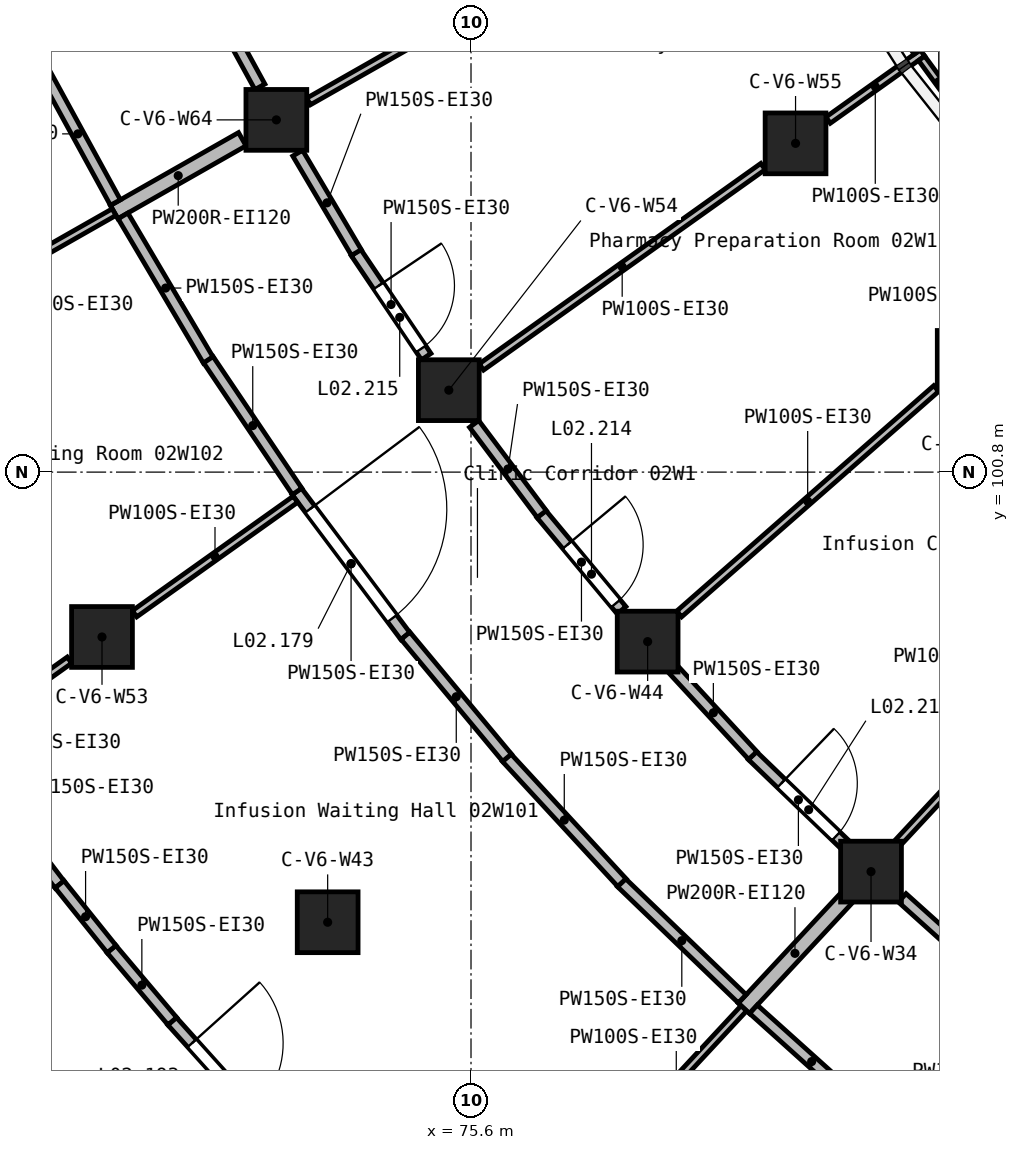
"""IFC4 building model, lengths in metres.
Left out: names, types, materials, properties, quantities, classifications, styles, units other than length and angle.
Written with IfcOpenShell. Run it as: python <this file> out.ifc"""

import sys

from ifc_helpers import new_model, si_unit, direction, frame, frame_2d, origin, origin_2d, place, context, subcontext, project, spatial, rectangle, extrude, element, fill, save


model = new_model("IFC4")
c1 = context("Model", 3, precision=1e-05, world=origin(), true_north=direction((0.0, 1.0)))
c2 = subcontext(c1, "Body", "Model", "MODEL_VIEW")
j1 = project(units=[si_unit("LENGTHUNIT", "METRE"), si_unit("PLANEANGLEUNIT", "RADIAN")], contexts=[c1])
p1 = place(None, origin())
s1 = spatial("IfcSite", under=j1, at=p1, CompositionType="ELEMENT")
p2 = place(p1, origin())
s2 = spatial("IfcBuilding", under=s1, at=p2, CompositionType="ELEMENT")
p3 = place(p2, frame((0.0, 0.0, 12.6)))
s3 = spatial("IfcBuildingStorey", under=s2, at=p3, CompositionType="ELEMENT", Elevation=12.6)
for number, where, z_axis, x_axis in (
    (1, (70.745, 98.631, 0.0), (0.0, 0.0, 1.0), (1.0, 0.0, 0.0)),
    (2, (73.039, 105.434, 0.0), (0.0, 0.0, 1.0), (1.0, 0.0, 0.0)),
    (3, (73.714, 94.878, 0.0), (0.0, 0.0, 1.0), (1.0, 0.0, 0.0)),
    (4, (75.308, 101.878, 0.0), (0.0, 0.0, 1.0), (1.0, 0.0, 0.0)),
    (5, (77.924, 98.57, 0.0), (0.0, 0.0, 1.0), (1.0, 0.0, 0.0)),
    (6, (79.87, 105.125, 0.0), (0.0, 0.0, 1.0), (1.0, 0.0, 0.0)),
    (7, (80.863, 95.544, 0.0), (0.0, 0.0, 1.0), (1.0, 0.0, 0.0)),
    (8, (82.135, 102.263, 0.0), (0.0, 0.0, 1.0), (1.0, 0.0, 0.0)),
):
    element("IfcColumn", number, at=place(p3, frame(where, z_axis=z_axis, x_axis=x_axis)), inside=s3, PredefinedType="COLUMN", context=c2, shape_type="SweptSolid", body=[
        extrude(rectangle(XDim=0.8, YDim=0.8, at=origin_2d()), origin(), (0.0, 0.0, 1.0), 4.2),
    ])
p4 = place(p3, frame((70.905, 104.221, 0.0), z_axis=(0.0, 0.0, 1.0), x_axis=(0.869256176146, 0.494361912198, 0.0)))
e9 = element("IfcWall", 9, at=p4, inside=s3, PredefinedType="SOLIDWALL", context=c2, shape_type="SweptSolid", body=[
    extrude(rectangle(XDim=1.939, YDim=0.2, at=frame_2d((0.97, 0.0))), origin(), (0.0, 0.0, 1.0), 3.85),
])
p5 = place(p3, frame((79.19, 93.746, 0.0), z_axis=(0.0, 0.0, 1.0), x_axis=(0.681171780306, 0.732123627344, 0.0)))
e10 = element("IfcWall", 10, at=p5, inside=s3, PredefinedType="SOLIDWALL", context=c2, shape_type="SweptSolid", body=[
    extrude(rectangle(XDim=1.974, YDim=0.2, at=frame_2d((0.987, 0.0))), origin(), (0.0, 0.0, 1.0), 3.85),
])
p6 = place(p3, frame((73.307, 100.547, 0.0), z_axis=(0.0, 0.0, 1.0), x_axis=(0.600377090661, -0.799717043091, 0.0)))
e11 = element("IfcWall", 11, at=p6, inside=s3, PredefinedType="PARTITIONING", context=c2, shape_type="SweptSolid", body=[
    extrude(rectangle(XDim=2.382, YDim=0.15, at=frame_2d((1.191, 0.0))), origin(), (0.0, 0.0, 1.0), 3.85),
])
p7 = place(p6, frame((0.291, 0.0, 0.0)))
e12 = element("IfcOpeningElement", 12, at=p7, cuts=e11, PredefinedType="OPENING", context=c2, shape_type="SweptSolid", body=[
    extrude(rectangle(XDim=1.8, YDim=2.1, at=frame_2d((0.9, 1.05))), frame((0.0, 0.085, 0.0), z_axis=(0.0, -1.0, 0.0), x_axis=(1.0, 0.0, 0.0)), (0.0, 0.0, 1.0), 0.17),
])
p8 = place(p3, frame((77.579, 95.4, 0.0), z_axis=(0.0, 0.0, 1.0), x_axis=(0.720594722174, -0.693356507415, 0.0)))
e13 = element("IfcWall", 13, at=p8, inside=s3, PredefinedType="PARTITIONING", context=c2, shape_type="SweptSolid", body=[
    extrude(rectangle(XDim=2.205, YDim=0.15, at=frame_2d((1.103, 0.0))), origin(), (0.0, 0.0, 1.0), 3.85),
])
p9 = place(p3, frame((76.069, 97.043, 0.0), z_axis=(0.0, 0.0, 1.0), x_axis=(0.678030610295, -0.735033666918, 0.0)))
e14 = element("IfcWall", 14, at=p9, inside=s3, PredefinedType="PARTITIONING", context=c2, shape_type="SweptSolid", body=[
    extrude(rectangle(XDim=2.236, YDim=0.15, at=frame_2d((1.118, 0.0))), origin(), (0.0, 0.0, 1.0), 3.85),
])
p10 = place(p3, frame((71.021, 104.171, 0.0), z_axis=(0.0, 0.0, 1.0), x_axis=(0.50873677225, -0.860922119916, 0.0)))
e15 = element("IfcWall", 15, at=p10, inside=s3, PredefinedType="PARTITIONING", context=c2, shape_type="SweptSolid", body=[
    extrude(rectangle(XDim=2.205, YDim=0.15, at=frame_2d((1.103, 0.0))), origin(), (0.0, 0.0, 1.0), 3.85),
])
p11 = place(p3, frame((79.316, 93.733, 0.0), z_axis=(0.0, 0.0, 1.0), x_axis=(0.74346507851, -0.668774758073, 0.0)))
e16 = element("IfcWall", 16, at=p11, inside=s3, PredefinedType="PARTITIONING", context=c2, shape_type="SweptSolid", body=[
    extrude(rectangle(XDim=2.059, YDim=0.15, at=frame_2d((1.03, 0.0))), origin(), (0.0, 0.0, 1.0), 3.85),
])
p12 = place(p3, frame((72.145, 102.278, 0.0), z_axis=(0.0, 0.0, 1.0), x_axis=(0.558900636953, -0.829234633873, 0.0)))
e17 = element("IfcWall", 17, at=p12, inside=s3, PredefinedType="PARTITIONING", context=c2, shape_type="SweptSolid", body=[
    extrude(rectangle(XDim=2.089, YDim=0.15, at=frame_2d((1.044, 0.0))), origin(), (0.0, 0.0, 1.0), 3.85),
])
p13 = place(p3, frame((74.738, 98.647, 0.0), z_axis=(0.0, 0.0, 1.0), x_axis=(0.640000381719, -0.768374590548, 0.0)))
e18 = element("IfcWall", 18, at=p13, inside=s3, PredefinedType="PARTITIONING", context=c2, shape_type="SweptSolid", body=[
    extrude(rectangle(XDim=2.088, YDim=0.15, at=frame_2d((1.044, 0.0))), origin(), (0.0, 0.0, 1.0), 3.85),
])
p14 = place(p3, frame((69.933, 106.153, 0.0), z_axis=(0.0, 0.0, 1.0), x_axis=(0.479964929401, -0.877287676047, 0.0)))
e19 = element("IfcWall", 19, at=p14, inside=s3, PredefinedType="PARTITIONING", context=c2, shape_type="SweptSolid", body=[
    extrude(rectangle(XDim=2.059, YDim=0.15, at=frame_2d((1.03, 0.0))), origin(), (0.0, 0.0, 1.0), 3.85),
])
p15 = place(p3, frame((74.086, 103.69, 0.0), z_axis=(0.0, 0.0, 1.0), x_axis=(0.558985889655, -0.829177167538, 0.0)))
e20 = element("IfcWall", 20, at=p15, inside=s3, PredefinedType="PARTITIONING", context=c2, shape_type="SweptSolid", body=[
    extrude(rectangle(XDim=1.654, YDim=0.15, at=frame_2d((0.827, 0.0))), origin(), (0.0, 0.0, 1.0), 3.85),
])
p16 = place(p15, frame((0.53, 0.0, 0.0)))
e21 = element("IfcOpeningElement", 21, at=p16, cuts=e20, PredefinedType="OPENING", context=c2, shape_type="SweptSolid", body=[
    extrude(rectangle(XDim=1.0, YDim=2.1, at=frame_2d((0.5, 1.05))), frame((0.0, 0.085, 0.0), z_axis=(0.0, -1.0, 0.0), x_axis=(1.0, 0.0, 0.0)), (0.0, 0.0, 1.0), 0.17),
])
p17 = place(p3, frame((79.301, 97.072, 0.0), z_axis=(0.0, 0.0, 1.0), x_axis=(0.720465115712, -0.69349118022, 0.0)))
e22 = element("IfcWall", 22, at=p17, inside=s3, PredefinedType="PARTITIONING", context=c2, shape_type="SweptSolid", body=[
    extrude(rectangle(XDim=1.684, YDim=0.15, at=frame_2d((0.842, 0.0))), origin(), (0.0, 0.0, 1.0), 3.85),
])
p18 = place(p17, frame((0.53, 0.0, 0.0)))
e23 = element("IfcOpeningElement", 23, at=p18, cuts=e22, PredefinedType="OPENING", context=c2, shape_type="SweptSolid", body=[
    extrude(rectangle(XDim=1.0, YDim=2.1, at=frame_2d((0.5, 1.05))), frame((0.0, 0.085, 0.0), z_axis=(0.0, -1.0, 0.0), x_axis=(1.0, 0.0, 0.0)), (0.0, 0.0, 1.0), 0.17),
])
p19 = place(p3, frame((78.27, 98.195, 0.0), z_axis=(0.0, 0.0, 1.0), x_axis=(0.678273469528, -0.73480956753, 0.0)))
e24 = element("IfcWall", 24, at=p19, inside=s3, PredefinedType="PARTITIONING", context=c2, shape_type="SweptSolid", body=[
    extrude(rectangle(XDim=1.529, YDim=0.15, at=frame_2d((0.764, 0.0))), origin(), (0.0, 0.0, 1.0), 3.85),
])
p20 = place(p3, frame((76.526, 100.249, 0.0), z_axis=(0.0, 0.0, 1.0), x_axis=(0.640038659854, -0.768342706019, 0.0)))
e25 = element("IfcWall", 25, at=p20, inside=s3, PredefinedType="PARTITIONING", context=c2, shape_type="SweptSolid", body=[
    extrude(rectangle(XDim=1.648, YDim=0.15, at=frame_2d((0.824, 0.0))), origin(), (0.0, 0.0, 1.0), 3.85),
])
p21 = place(p20, frame((0.53, 0.0, 0.0)))
e26 = element("IfcOpeningElement", 26, at=p21, cuts=e25, PredefinedType="OPENING", context=c2, shape_type="SweptSolid", body=[
    extrude(rectangle(XDim=1.0, YDim=2.1, at=frame_2d((0.5, 1.05))), frame((0.0, 0.085, 0.0), z_axis=(0.0, -1.0, 0.0), x_axis=(1.0, 0.0, 0.0)), (0.0, 0.0, 1.0), 0.17),
])
p22 = place(p3, frame((73.319, 104.997, 0.0), z_axis=(0.0, 0.0, 1.0), x_axis=(0.508740142918, -0.86092012811, 0.0)))
e27 = element("IfcWall", 27, at=p22, inside=s3, PredefinedType="PARTITIONING", context=c2, shape_type="SweptSolid", body=[
    extrude(rectangle(XDim=1.519, YDim=0.15, at=frame_2d((0.759, 0.0))), origin(), (0.0, 0.0, 1.0), 3.85),
])
p23 = place(p3, frame((75.641, 101.434, 0.0), z_axis=(0.0, 0.0, 1.0), x_axis=(0.60023710435, -0.799822116825, 0.0)))
e28 = element("IfcWall", 28, at=p23, inside=s3, PredefinedType="PARTITIONING", context=c2, shape_type="SweptSolid", body=[
    extrude(rectangle(XDim=1.483, YDim=0.15, at=frame_2d((0.741, 0.0))), origin(), (0.0, 0.0, 1.0), 3.85),
])
p24 = place(p3, frame((81.273, 95.199, 0.0), z_axis=(0.0, 0.0, 1.0), x_axis=(0.743576936712, -0.668650386368, 0.0)))
e29 = element("IfcWall", 29, at=p24, inside=s3, PredefinedType="PARTITIONING", context=c2, shape_type="SweptSolid", body=[
    extrude(rectangle(XDim=1.502, YDim=0.15, at=frame_2d((0.751, 0.0))), origin(), (0.0, 0.0, 1.0), 3.85),
])
p25 = place(p3, frame((72.077, 107.232, 0.0), z_axis=(0.0, 0.0, 1.0), x_axis=(0.480041086357, -0.877246006209, 0.0)))
e30 = element("IfcWall", 30, at=p25, inside=s3, PredefinedType="PARTITIONING", context=c2, shape_type="SweptSolid", body=[
    extrude(rectangle(XDim=1.553, YDim=0.15, at=frame_2d((0.777, 0.0))), origin(), (0.0, 0.0, 1.0), 3.85),
])
p26 = place(p3, frame((71.667, 93.577, 0.0), z_axis=(0.0, 0.0, 1.0), x_axis=(0.668733315137, -0.743502355898, 0.0)))
e31 = element("IfcWall", 31, at=p26, inside=s3, PredefinedType="PARTITIONING", context=c2, shape_type="SweptSolid", body=[
    extrude(rectangle(XDim=1.982, YDim=0.15, at=frame_2d((0.991, 0.0))), origin(), (0.0, 0.0, 1.0), 3.85),
])
p27 = place(p26, frame((0.391, 0.0, 0.0)))
e32 = element("IfcOpeningElement", 32, at=p27, cuts=e31, PredefinedType="OPENING", context=c2, shape_type="SweptSolid", body=[
    extrude(rectangle(XDim=1.2, YDim=2.1, at=frame_2d((0.6, 1.05))), frame((0.0, 0.085, 0.0), z_axis=(0.0, -1.0, 0.0), x_axis=(1.0, 0.0, 0.0)), (0.0, 0.0, 1.0), 0.17),
])
p28 = place(p3, frame((69.433, 96.362, 0.0), z_axis=(0.0, 0.0, 1.0), x_axis=(0.606457599152, -0.795115828311, 0.0)))
e33 = element("IfcWall", 33, at=p28, inside=s3, PredefinedType="PARTITIONING", context=c2, shape_type="SweptSolid", body=[
    extrude(rectangle(XDim=1.242, YDim=0.15, at=frame_2d((0.621, 0.0))), origin(), (0.0, 0.0, 1.0), 3.85),
])
p29 = place(p3, frame((70.869, 94.525, 0.0), z_axis=(0.0, 0.0, 1.0), x_axis=(0.645236922374, -0.763982535144, 0.0)))
e34 = element("IfcWall", 34, at=p29, inside=s3, PredefinedType="PARTITIONING", context=c2, shape_type="SweptSolid", body=[
    extrude(rectangle(XDim=1.242, YDim=0.15, at=frame_2d((0.621, 0.0))), origin(), (0.0, 0.0, 1.0), 3.85),
])
p30 = place(p3, frame((70.187, 95.377, 0.0), z_axis=(0.0, 0.0, 1.0), x_axis=(0.626301399266, -0.779581013928, 0.0)))
e35 = element("IfcWall", 35, at=p30, inside=s3, PredefinedType="PARTITIONING", context=c2, shape_type="SweptSolid", body=[
    extrude(rectangle(XDim=1.093, YDim=0.15, at=frame_2d((0.546, 0.0))), origin(), (0.0, 0.0, 1.0), 3.85),
])
p31 = place(p3, frame((78.338, 98.933, 0.0), z_axis=(0.0, 0.0, 1.0), x_axis=(0.751823288541, 0.659364650863, 0.0)))
e36 = element("IfcWall", 36, at=p31, inside=s3, PredefinedType="PARTITIONING", context=c2, shape_type="SweptSolid", body=[
    extrude(rectangle(XDim=4.5, YDim=0.1, at=frame_2d((2.25, 0.0))), origin(), (0.0, 0.0, 1.0), 3.85),
])
p32 = place(p3, frame((75.736, 102.183, 0.0), z_axis=(0.0, 0.0, 1.0), x_axis=(0.8147152487, 0.579861245072, 0.0)))
e37 = element("IfcWall", 37, at=p32, inside=s3, PredefinedType="PARTITIONING", context=c2, shape_type="SweptSolid", body=[
    extrude(rectangle(XDim=4.548, YDim=0.1, at=frame_2d((2.274, 0.0))), origin(), (0.0, 0.0, 1.0), 3.85),
])
p33 = place(p3, frame((80.298, 105.43, 0.0), z_axis=(0.0, 0.0, 1.0), x_axis=(0.814728250396, 0.579842977027, 0.0)))
e38 = element("IfcWall", 38, at=p33, inside=s3, PredefinedType="PARTITIONING", context=c2, shape_type="SweptSolid", body=[
    extrude(rectangle(XDim=1.524, YDim=0.1, at=frame_2d((0.762, 0.0))), origin(), (0.0, 0.0, 1.0), 3.85),
])
p34 = place(p3, frame((81.227, 95.935, 0.0), z_axis=(0.0, 0.0, 1.0), x_axis=(0.681211440492, 0.732086725288, 0.0)))
e39 = element("IfcWall", 39, at=p34, inside=s3, PredefinedType="PARTITIONING", context=c2, shape_type="SweptSolid", body=[
    extrude(rectangle(XDim=4.53, YDim=0.1, at=frame_2d((2.265, 0.0))), origin(), (0.0, 0.0, 1.0), 3.85),
])
p35 = place(p3, frame((73.463, 105.676, 0.0), z_axis=(0.0, 0.0, 1.0), x_axis=(0.8692549769, 0.494364020874, 0.0)))
e40 = element("IfcWall", 40, at=p35, inside=s3, PredefinedType="PARTITIONING", context=c2, shape_type="SweptSolid", body=[
    extrude(rectangle(XDim=4.625, YDim=0.1, at=frame_2d((2.312, 0.0))), origin(), (0.0, 0.0, 1.0), 3.85),
])
p36 = place(p3, frame((68.595, 102.907, 0.0), z_axis=(0.0, 0.0, 1.0), x_axis=(0.869270757215, 0.494336272846, 0.0)))
e41 = element("IfcWall", 41, at=p36, inside=s3, PredefinedType="PARTITIONING", context=c2, shape_type="SweptSolid", body=[
    extrude(rectangle(XDim=2.656, YDim=0.1, at=frame_2d((1.328, 0.0))), origin(), (0.0, 0.0, 1.0), 3.85),
])
p37 = place(p3, frame((77.412, 91.835, 0.0), z_axis=(0.0, 0.0, 1.0), x_axis=(0.681147107729, 0.732146582067, 0.0)))
e42 = element("IfcWall", 42, at=p37, inside=s3, PredefinedType="PARTITIONING", context=c2, shape_type="SweptSolid", body=[
    extrude(rectangle(XDim=2.609, YDim=0.1, at=frame_2d((1.304, 0.0))), origin(), (0.0, 0.0, 1.0), 3.85),
])
p38 = place(p3, frame((68.861, 97.29, 0.0), z_axis=(0.0, 0.0, 1.0), x_axis=(0.814701484378, 0.5798805837, 0.0)))
e43 = element("IfcWall", 43, at=p38, inside=s3, PredefinedType="PARTITIONING", context=c2, shape_type="SweptSolid", body=[
    extrude(rectangle(XDim=1.787, YDim=0.1, at=frame_2d((0.894, 0.0))), origin(), (0.0, 0.0, 1.0), 3.85),
])
p39 = place(p3, frame((71.173, 98.936, 0.0), z_axis=(0.0, 0.0, 1.0), x_axis=(0.814672160951, 0.579921779355, 0.0)))
e44 = element("IfcWall", 44, at=p39, inside=s3, PredefinedType="PARTITIONING", context=c2, shape_type="SweptSolid", body=[
    extrude(rectangle(XDim=2.598, YDim=0.1, at=frame_2d((1.299, 0.0))), origin(), (0.0, 0.0, 1.0), 3.85),
])
p40 = place(p3, frame((80.657, 107.527, 0.0), z_axis=(0.0, 0.0, 1.0), x_axis=(0.561086061718, -0.827757471332, 0.0)))
e45 = element("IfcWall", 45, at=p40, inside=s3, PredefinedType="PARTITIONING", context=c2, shape_type="SweptSolid", body=[
    extrude(rectangle(XDim=1.452, YDim=0.1, at=frame_2d((0.726, 0.0))), origin(), (0.0, 0.0, 1.0), 3.85),
])
p41 = place(p3, frame((81.529, 106.244, 0.0), z_axis=(0.0, 0.0, 1.0), x_axis=(0.590281268128, -0.807197636578, 0.0)))
e46 = element("IfcWall", 46, at=p41, inside=s3, PredefinedType="PARTITIONING", context=c2, shape_type="SweptSolid", body=[
    extrude(rectangle(XDim=0.763, YDim=0.1, at=frame_2d((0.382, 0.0))), origin(), (0.0, 0.0, 1.0), 3.85),
])
p42 = place(p7, origin())
e47 = element("IfcDoor", 47, at=p42, inside=s3, OperationType="DOUBLE_DOOR_SINGLE_SWING", PredefinedType="DOOR", context=c2, shape_type="SweptSolid", body=[
    extrude(rectangle(XDim=1.8, YDim=2.1, at=frame_2d((0.9, 1.05))), frame((0.0, 0.025, 0.0), z_axis=(0.0, -1.0, 0.0), x_axis=(1.0, 0.0, 0.0)), (0.0, 0.0, 1.0), 0.05),
])
fill(e12, e47)
p43 = place(p27, frame((1.2, 0.0, 0.0), z_axis=(0.0, 0.0, 1.0), x_axis=(-1.0, 0.0, 0.0)))
e48 = element("IfcDoor", 48, at=p43, inside=s3, OperationType="SINGLE_SWING_RIGHT", PredefinedType="DOOR", context=c2, shape_type="SweptSolid", body=[
    extrude(rectangle(XDim=1.2, YDim=2.1, at=frame_2d((0.6, 1.05))), frame((0.0, 0.025, 0.0), z_axis=(0.0, -1.0, 0.0), x_axis=(1.0, 0.0, 0.0)), (0.0, 0.0, 1.0), 0.05),
])
fill(e32, e48)
p44 = place(p18, origin())
e49 = element("IfcDoor", 49, at=p44, inside=s3, OperationType="SINGLE_SWING_RIGHT", PredefinedType="DOOR", context=c2, shape_type="SweptSolid", body=[
    extrude(rectangle(XDim=1.0, YDim=2.1, at=frame_2d((0.5, 1.05))), frame((0.0, 0.025, 0.0), z_axis=(0.0, -1.0, 0.0), x_axis=(1.0, 0.0, 0.0)), (0.0, 0.0, 1.0), 0.05),
])
fill(e23, e49)
p45 = place(p21, origin())
e50 = element("IfcDoor", 50, at=p45, inside=s3, OperationType="SINGLE_SWING_RIGHT", PredefinedType="DOOR", context=c2, shape_type="SweptSolid", body=[
    extrude(rectangle(XDim=1.0, YDim=2.1, at=frame_2d((0.5, 1.05))), frame((0.0, 0.025, 0.0), z_axis=(0.0, -1.0, 0.0), x_axis=(1.0, 0.0, 0.0)), (0.0, 0.0, 1.0), 0.05),
])
fill(e26, e50)
p46 = place(p16, origin())
e51 = element("IfcDoor", 51, at=p46, inside=s3, OperationType="SINGLE_SWING_RIGHT", PredefinedType="DOOR", context=c2, shape_type="SweptSolid", body=[
    extrude(rectangle(XDim=1.0, YDim=2.1, at=frame_2d((0.5, 1.05))), frame((0.0, 0.025, 0.0), z_axis=(0.0, -1.0, 0.0), x_axis=(1.0, 0.0, 0.0)), (0.0, 0.0, 1.0), 0.05),
])
fill(e21, e51)
save(model, sys.argv[1])
